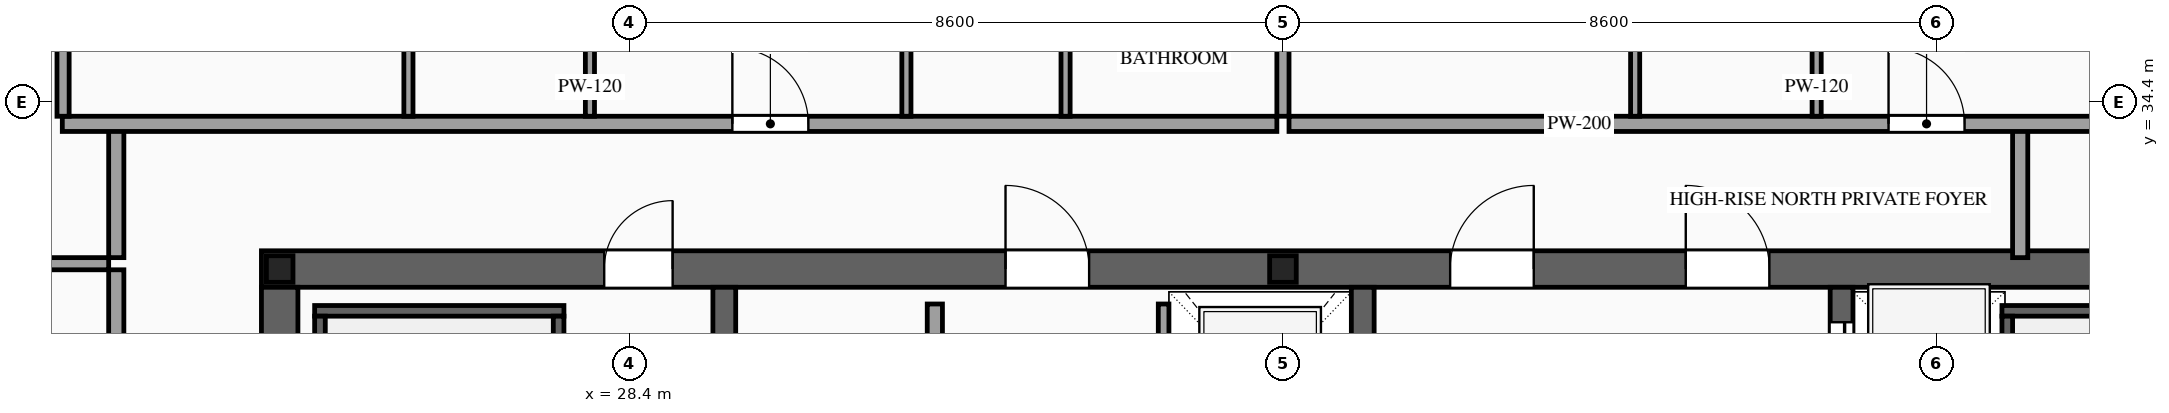
"""IFC4 building model, lengths in metres.
Left out: names, types, materials, properties, quantities, classifications, styles, units other than length and angle.
Written with IfcOpenShell. Run it as: python <this file> out.ifc"""

import sys

from ifc_helpers import new_model, si_unit, direction, frame, frame_2d, origin, origin_2d, place, context, subcontext, project, spatial, rectangle, i_section, extrude, source, transform, mapped, element, fill, save


model = new_model("IFC4")
c1 = context("Model", 3, precision=1e-05, world=origin(), true_north=direction((0.0, 1.0)))
c2 = subcontext(c1, "Body", "Model", "MODEL_VIEW")
j1 = project(units=[si_unit("LENGTHUNIT", "METRE"), si_unit("PLANEANGLEUNIT", "RADIAN")], contexts=[c1])
p1 = place(None, origin())
s1 = spatial("IfcSite", under=j1, at=p1, CompositionType="ELEMENT")
p2 = place(p1, origin())
s2 = spatial("IfcBuilding", under=s1, at=p2, CompositionType="ELEMENT")
p3 = place(p2, frame((0.0, 0.0, 332.2)))
s3 = spatial("IfcBuildingStorey", under=s2, at=p3, CompositionType="ELEMENT", Elevation=332.2)
p4 = place(p3, frame((23.56, 32.2, 0.0), z_axis=(0.0, 0.0, 1.0), x_axis=(1.0, 0.0, 0.0)))
e1 = element("IfcWall", 1, at=p4, inside=s3, PredefinedType="SHEAR", context=c2, shape_type="SweptSolid", body=[
    extrude(rectangle(XDim=26.88, YDim=0.48, at=frame_2d((13.44, 0.0))), origin(), (0.0, 0.0, 1.0), 3.5),
])
p5 = place(p4, frame((4.51, 0.0, 0.0)))
e2 = element("IfcOpeningElement", 2, at=p5, cuts=e1, PredefinedType="OPENING", context=c2, shape_type="SweptSolid", body=[
    extrude(rectangle(XDim=0.9, YDim=2.15, at=frame_2d((0.45, 1.075))), frame((0.0, 0.255, 0.0), z_axis=(0.0, -1.0, 0.0), x_axis=(1.0, 0.0, 0.0)), (0.0, 0.0, 1.0), 0.51),
])
p6 = place(p4, frame((9.79, 0.0, 0.0)))
e3 = element("IfcOpeningElement", 3, at=p6, cuts=e1, PredefinedType="OPENING", context=c2, shape_type="SweptSolid", body=[
    extrude(rectangle(XDim=1.1, YDim=2.2, at=frame_2d((0.55, 1.1))), frame((0.0, 0.255, 0.0), z_axis=(0.0, -1.0, 0.0), x_axis=(1.0, 0.0, 0.0)), (0.0, 0.0, 1.0), 0.51),
])
p7 = place(p4, frame((15.64, 0.0, 0.0)))
e4 = element("IfcOpeningElement", 4, at=p7, cuts=e1, PredefinedType="OPENING", context=c2, shape_type="SweptSolid", body=[
    extrude(rectangle(XDim=1.1, YDim=2.2, at=frame_2d((0.55, 1.1))), frame((0.0, 0.255, 0.0), z_axis=(0.0, -1.0, 0.0), x_axis=(1.0, 0.0, 0.0)), (0.0, 0.0, 1.0), 0.51),
])
p8 = place(p4, frame((18.74, 0.0, 0.0)))
e5 = element("IfcOpeningElement", 5, at=p8, cuts=e1, PredefinedType="OPENING", context=c2, shape_type="SweptSolid", body=[
    extrude(rectangle(XDim=1.1, YDim=2.2, at=frame_2d((0.55, 1.1))), frame((0.0, 0.255, 0.0), z_axis=(0.0, -1.0, 0.0), x_axis=(1.0, 0.0, 0.0)), (0.0, 0.0, 1.0), 0.51),
])
m1 = source(origin(), c2, "Body", "SweptSolid", [
    extrude(rectangle(XDim=12.32, YDim=0.48, at=frame_2d((6.16, 0.0))), origin(), (0.0, 0.0, 1.0), 3.5),
])
p9 = place(p3, frame((23.8, 19.64, 0.0), z_axis=(0.0, 0.0, 1.0), x_axis=(0.0, 1.0, 0.0)))
e6 = element("IfcWall", 6, at=p9, inside=s3, PredefinedType="SHEAR", context=c2, shape_type="MappedRepresentation", body=[
    mapped(m1, transform((0.0, 0.0, 0.0), scale=1.0)),
])
m2 = source(origin(), c2, "Body", "SweptSolid", [
    extrude(rectangle(XDim=12.32, YDim=0.3, at=frame_2d((6.16, 0.0))), origin(), (0.0, 0.0, 1.0), 3.5),
])
for number, where, z_axis, x_axis in (
    (7, (29.65, 19.64, 0.0), (0.0, 0.0, 1.0), (0.0, 1.0, 0.0)),
    (8, (38.05, 19.64, 0.0), (0.0, 0.0, 1.0), (0.0, 1.0, 0.0)),
):
    element("IfcWall", number, at=place(p3, frame(where, z_axis=z_axis, x_axis=x_axis)), inside=s3, PredefinedType="SOLIDWALL", context=c2, shape_type="MappedRepresentation", body=[
        mapped(m2, transform((0.0, 0.0, 0.0), scale=1.0)),
    ])
p10 = place(p3, frame((44.35, 19.64, 0.0), z_axis=(0.0, 0.0, 1.0), x_axis=(0.0, 1.0, 0.0)))
e9 = element("IfcWall", 9, at=p10, inside=s3, PredefinedType="SOLIDWALL", context=c2, shape_type="SweptSolid", body=[
    extrude(rectangle(XDim=12.32, YDim=0.3, at=frame_2d((6.16, 0.0))), origin(), (0.0, 0.0, 1.0), 3.5),
])
p11 = place(p10, frame((6.56, 0.0, 0.0)))
e10 = element("IfcOpeningElement", 10, at=p11, cuts=e9, PredefinedType="OPENING", context=c2, shape_type="SweptSolid", body=[
    extrude(rectangle(XDim=1.1, YDim=2.2, at=frame_2d((0.55, 1.1))), frame((0.0, 0.165, 0.0), z_axis=(0.0, -1.0, 0.0), x_axis=(1.0, 0.0, 0.0)), (0.0, 0.0, 1.0), 0.33),
])
p12 = place(p10, frame((8.66, 0.0, 0.0)))
e11 = element("IfcOpeningElement", 11, at=p12, cuts=e9, PredefinedType="OPENING", context=c2, shape_type="SweptSolid", body=[
    extrude(rectangle(XDim=1.1, YDim=2.2, at=frame_2d((0.55, 1.1))), frame((0.0, 0.165, 0.0), z_axis=(0.0, -1.0, 0.0), x_axis=(1.0, 0.0, 0.0)), (0.0, 0.0, 1.0), 0.33),
])
p13 = place(p10, frame((10.76, 0.0, 0.0)))
e12 = element("IfcOpeningElement", 12, at=p13, cuts=e9, PredefinedType="OPENING", context=c2, shape_type="SweptSolid", body=[
    extrude(rectangle(XDim=1.1, YDim=2.2, at=frame_2d((0.55, 1.1))), frame((0.0, 0.165, 0.0), z_axis=(0.0, -1.0, 0.0), x_axis=(1.0, 0.0, 0.0)), (0.0, 0.0, 1.0), 0.33),
])
m3 = source(origin(), c2, "Body", "SweptSolid", [
    extrude(i_section(OverallWidth=0.35, OverallDepth=0.35, WebThickness=0.012, FlangeThickness=0.019, at=origin_2d()), origin(), (0.0, 0.0, 1.0), 3.5),
])
for number, where, z_axis, x_axis in (
    (13, (23.8, 32.2, 0.0), (0.0, 0.0, 1.0), (1.0, 0.0, 0.0)),
    (14, (37.0, 32.2, 0.0), (0.0, 0.0, 1.0), (1.0, 0.0, 0.0)),
):
    element("IfcColumn", number, at=place(p3, frame(where, z_axis=z_axis, x_axis=x_axis)), inside=s3, PredefinedType="COLUMN", context=c2, shape_type="MappedRepresentation", body=[
        mapped(m3, transform((0.0, 0.0, 0.0), scale=1.0)),
    ])
p14 = place(p3, frame((35.43, 29.4, 0.0), z_axis=(0.0, 0.0, 1.0), x_axis=(0.0, 1.0, 0.0)))
e15 = element("IfcWall", 15, at=p14, inside=s3, PredefinedType="SOLIDWALL", context=c2, shape_type="SweptSolid", body=[
    extrude(rectangle(XDim=2.34, YDim=0.14, at=frame_2d((1.17, 0.0))), origin(), (0.0, 0.0, 1.0), 3.28),
])
p15 = place(p14, frame((0.62, 0.0, 0.0)))
e16 = element("IfcOpeningElement", 16, at=p15, cuts=e15, PredefinedType="OPENING", context=c2, shape_type="SweptSolid", body=[
    extrude(rectangle(XDim=1.1, YDim=2.2, at=frame_2d((0.55, 1.1))), frame((0.0, 0.085, 0.0), z_axis=(0.0, -1.0, 0.0), x_axis=(1.0, 0.0, 0.0)), (0.0, 0.0, 1.0), 0.17),
])
m4 = source(origin(), c2, "Body", "SweptSolid", [
    extrude(rectangle(XDim=3.28, YDim=0.14, at=frame_2d((1.64, 0.0))), origin(), (0.0, 0.0, 1.0), 3.28),
])
p16 = place(p3, frame((24.26, 31.65, 0.0), z_axis=(0.0, 0.0, 1.0), x_axis=(1.0, 0.0, 0.0)))
e17 = element("IfcWall", 17, at=p16, inside=s3, PredefinedType="SOLIDWALL", context=c2, shape_type="MappedRepresentation", body=[
    mapped(m4, transform((0.0, 0.0, 0.0), scale=1.0)),
])
m5 = source(origin(), c2, "Body", "SweptSolid", [
    extrude(rectangle(XDim=8.94, YDim=0.14, at=frame_2d((4.47, 0.0))), origin(), (0.0, 0.0, 1.0), 3.28),
])
for number, where, z_axis, x_axis in (
    (18, (24.33, 22.64, 0.0), (0.0, 0.0, 1.0), (0.0, 1.0, 0.0)),
    (19, (27.47, 22.64, 0.0), (0.0, 0.0, 1.0), (0.0, 1.0, 0.0)),
):
    element("IfcWall", number, at=place(p3, frame(where, z_axis=z_axis, x_axis=x_axis)), inside=s3, PredefinedType="SOLIDWALL", context=c2, shape_type="MappedRepresentation", body=[
        mapped(m5, transform((0.0, 0.0, 0.0), scale=1.0)),
    ])
p17 = place(p3, frame((46.46, 31.65, 0.0), z_axis=(0.0, 0.0, 1.0), x_axis=(1.0, 0.0, 0.0)))
e20 = element("IfcWall", 20, at=p17, inside=s3, PredefinedType="SOLIDWALL", context=c2, shape_type="MappedRepresentation", body=[
    mapped(m4, transform((0.0, 0.0, 0.0), scale=1.0)),
])
p18 = place(p3, frame((46.53, 22.64, 0.0), z_axis=(0.0, 0.0, 1.0), x_axis=(0.0, 1.0, 0.0)))
e21 = element("IfcWall", 21, at=p18, inside=s3, PredefinedType="SOLIDWALL", context=c2, shape_type="MappedRepresentation", body=[
    mapped(m5, transform((0.0, 0.0, 0.0), scale=1.0)),
])
p19 = place(p3, frame((32.42, 24.05, 0.0), z_axis=(0.0, 0.0, 1.0), x_axis=(0.0, 1.0, 0.0)))
e22 = element("IfcWall", 22, at=p19, inside=s3, PredefinedType="PARTITIONING", context=c2, shape_type="SweptSolid", body=[
    extrude(rectangle(XDim=7.69, YDim=0.2, at=frame_2d((3.845, 0.0))), origin(), (0.0, 0.0, 1.0), 3.28),
])
p20 = place(p19, frame((3.395, 0.0, 0.0)))
e23 = element("IfcOpeningElement", 23, at=p20, cuts=e22, PredefinedType="OPENING", context=c2, shape_type="SweptSolid", body=[
    extrude(rectangle(XDim=0.9, YDim=2.15, at=frame_2d((0.45, 1.075))), frame((0.0, 0.115, 0.0), z_axis=(0.0, -1.0, 0.0), x_axis=(1.0, 0.0, 0.0)), (0.0, 0.0, 1.0), 0.23),
])
m6 = source(origin(), c2, "Body", "SweptSolid", [
    extrude(rectangle(XDim=1.7, YDim=0.2, at=frame_2d((0.85, 0.0))), origin(), (0.0, 0.0, 1.0), 3.28),
])
for number, where, z_axis, x_axis in (
    (24, (21.65, 32.35, 0.0), (0.0, 0.0, 1.0), (0.0, 1.0, 0.0)),
    (25, (46.7, 32.35, 0.0), (0.0, 0.0, 1.0), (0.0, 1.0, 0.0)),
):
    element("IfcWall", number, at=place(p3, frame(where, z_axis=z_axis, x_axis=x_axis)), inside=s3, PredefinedType="PARTITIONING", context=c2, shape_type="MappedRepresentation", body=[
        mapped(m6, transform((0.0, 0.0, 0.0), scale=1.0)),
    ])
p21 = place(p3, frame((20.94, 34.11, 0.0), z_axis=(0.0, 0.0, 1.0), x_axis=(1.0, 0.0, 0.0)))
e26 = element("IfcWall", 26, at=p21, inside=s3, PredefinedType="PARTITIONING", context=c2, shape_type="SweptSolid", body=[
    extrude(rectangle(XDim=15.98, YDim=0.2, at=frame_2d((7.99, 0.0))), origin(), (0.0, 0.0, 1.0), 3.28),
])
p22 = place(p21, frame((8.816, 0.0, 0.0)))
e27 = element("IfcOpeningElement", 27, at=p22, cuts=e26, PredefinedType="OPENING", context=c2, shape_type="SweptSolid", body=[
    extrude(rectangle(XDim=1.0, YDim=2.2, at=frame_2d((0.5, 1.1))), frame((0.0, 0.115, 0.0), z_axis=(0.0, -1.0, 0.0), x_axis=(1.0, 0.0, 0.0)), (0.0, 0.0, 1.0), 0.23),
])
m7 = source(origin(), c2, "Body", "SweptSolid", [
    extrude(rectangle(XDim=10.54, YDim=0.16, at=frame_2d((5.27, 0.0))), origin(), (0.0, 0.0, 1.0), 2.787),
])
p23 = place(p3, frame((37.0, 34.21, 0.0), z_axis=(0.0, 0.0, 1.0), x_axis=(0.0, 1.0, 0.0)))
e28 = element("IfcWall", 28, at=p23, inside=s3, PredefinedType="PARTITIONING", context=c2, shape_type="MappedRepresentation", body=[
    mapped(m7, transform((0.0, 0.0, 0.0), scale=1.0)),
])
m8 = source(origin(), c2, "Body", "SweptSolid", [
    extrude(rectangle(XDim=2.9, YDim=0.12, at=frame_2d((1.45, 0.0))), origin(), (0.0, 0.0, 1.0), 3.28),
])
p24 = place(p3, frame((25.494, 34.21, 0.0), z_axis=(0.0, 0.0, 1.0), x_axis=(0.0, 1.0, 0.0)))
e29 = element("IfcWall", 29, at=p24, inside=s3, PredefinedType="PARTITIONING", context=c2, shape_type="MappedRepresentation", body=[
    mapped(m8, transform((0.0, 0.0, 0.0), scale=1.0)),
])
p25 = place(p3, frame((27.882, 34.21, 0.0), z_axis=(0.0, 0.0, 1.0), x_axis=(0.0, 1.0, 0.0)))
e30 = element("IfcWall", 30, at=p25, inside=s3, PredefinedType="PARTITIONING", context=c2, shape_type="SweptSolid", body=[
    extrude(rectangle(XDim=2.9, YDim=0.12, at=frame_2d((1.45, 0.0))), origin(), (0.0, 0.0, 1.0), 3.28),
])
p26 = place(p25, frame((1.025, 0.0, 0.0)))
e31 = element("IfcOpeningElement", 31, at=p26, cuts=e30, PredefinedType="OPENING", context=c2, shape_type="SweptSolid", body=[
    extrude(rectangle(XDim=0.85, YDim=2.1, at=frame_2d((0.425, 1.05))), frame((0.0, 0.075, 0.0), z_axis=(0.0, -1.0, 0.0), x_axis=(1.0, 0.0, 0.0)), (0.0, 0.0, 1.0), 0.15),
])
for number, where, z_axis, x_axis in (
    (32, (34.14, 34.21, 0.0), (0.0, 0.0, 1.0), (0.0, 1.0, 0.0)),
    (33, (32.046, 34.21, 0.0), (0.0, 0.0, 1.0), (0.0, 1.0, 0.0)),
):
    element("IfcWall", number, at=place(p3, frame(where, z_axis=z_axis, x_axis=x_axis)), inside=s3, PredefinedType="PARTITIONING", context=c2, shape_type="MappedRepresentation", body=[
        mapped(m8, transform((0.0, 0.0, 0.0), scale=1.0)),
    ])
p27 = place(p3, frame((37.08, 34.11, 0.0), z_axis=(0.0, 0.0, 1.0), x_axis=(1.0, 0.0, 0.0)))
e34 = element("IfcWall", 34, at=p27, inside=s3, PredefinedType="PARTITIONING", context=c2, shape_type="SweptSolid", body=[
    extrude(rectangle(XDim=15.98, YDim=0.2, at=frame_2d((7.99, 0.0))), origin(), (0.0, 0.0, 1.0), 3.28),
])
p28 = place(p27, frame((7.888, 0.0, 0.0)))
e35 = element("IfcOpeningElement", 35, at=p28, cuts=e34, PredefinedType="OPENING", context=c2, shape_type="SweptSolid", body=[
    extrude(rectangle(XDim=1.0, YDim=2.2, at=frame_2d((0.5, 1.1))), frame((0.0, 0.115, 0.0), z_axis=(0.0, -1.0, 0.0), x_axis=(1.0, 0.0, 0.0)), (0.0, 0.0, 1.0), 0.23),
])
m9 = source(origin(), c2, "Body", "SweptSolid", [
    extrude(rectangle(XDim=10.39, YDim=0.16, at=frame_2d((5.195, 0.0))), origin(), (0.0, 0.0, 1.0), 3.28),
])
p29 = place(p3, frame((20.95, 34.21, 0.0), z_axis=(0.0, 0.0, 1.0), x_axis=(0.0, 1.0, 0.0)))
e36 = element("IfcWall", 36, at=p29, inside=s3, PredefinedType="PARTITIONING", context=c2, shape_type="MappedRepresentation", body=[
    mapped(m9, transform((0.0, 0.0, 0.0), scale=1.0)),
])
p30 = place(p3, frame((41.634, 34.21, 0.0), z_axis=(0.0, 0.0, 1.0), x_axis=(0.0, 1.0, 0.0)))
e37 = element("IfcWall", 37, at=p30, inside=s3, PredefinedType="PARTITIONING", context=c2, shape_type="MappedRepresentation", body=[
    mapped(m8, transform((0.0, 0.0, 0.0), scale=1.0)),
])
p31 = place(p3, frame((44.022, 34.21, 0.0), z_axis=(0.0, 0.0, 1.0), x_axis=(0.0, 1.0, 0.0)))
e38 = element("IfcWall", 38, at=p31, inside=s3, PredefinedType="PARTITIONING", context=c2, shape_type="SweptSolid", body=[
    extrude(rectangle(XDim=2.9, YDim=0.12, at=frame_2d((1.45, 0.0))), origin(), (0.0, 0.0, 1.0), 3.28),
])
p32 = place(p31, frame((1.025, 0.0, 0.0)))
e39 = element("IfcOpeningElement", 39, at=p32, cuts=e38, PredefinedType="OPENING", context=c2, shape_type="SweptSolid", body=[
    extrude(rectangle(XDim=0.85, YDim=2.1, at=frame_2d((0.425, 1.05))), frame((0.0, 0.075, 0.0), z_axis=(0.0, -1.0, 0.0), x_axis=(1.0, 0.0, 0.0)), (0.0, 0.0, 1.0), 0.15),
])
p33 = place(p3, frame((21.65, 19.41, 0.0), z_axis=(0.0, 0.0, 1.0), x_axis=(0.0, 1.0, 0.0)))
e40 = element("IfcWall", 40, at=p33, inside=s3, PredefinedType="PARTITIONING", context=c2, shape_type="SweptSolid", body=[
    extrude(rectangle(XDim=12.78, YDim=0.2, at=frame_2d((6.39, 0.0))), origin(), (0.0, 0.0, 1.0), 3.28),
])
p34 = place(p33, frame((5.89, 0.0, 0.0)))
e41 = element("IfcOpeningElement", 41, at=p34, cuts=e40, PredefinedType="OPENING", context=c2, shape_type="SweptSolid", body=[
    extrude(rectangle(XDim=1.0, YDim=2.2, at=frame_2d((0.5, 1.1))), frame((0.0, 0.115, 0.0), z_axis=(0.0, -1.0, 0.0), x_axis=(1.0, 0.0, 0.0)), (0.0, 0.0, 1.0), 0.23),
])
m10 = source(origin(), c2, "Body", "SweptSolid", [
    extrude(rectangle(XDim=3.5, YDim=0.16, at=frame_2d((1.75, 0.0))), origin(), (0.0, 0.0, 1.0), 2.825),
])
p35 = place(p3, frame((18.05, 32.27, 0.0), z_axis=(0.0, 0.0, 1.0), x_axis=(1.0, 0.0, 0.0)))
e42 = element("IfcWall", 42, at=p35, inside=s3, PredefinedType="PARTITIONING", context=c2, shape_type="MappedRepresentation", body=[
    mapped(m10, transform((0.0, 0.0, 0.0), scale=1.0)),
])
m11 = source(origin(), c2, "Body", "SweptSolid", [
    extrude(rectangle(XDim=1.1, YDim=2.2, at=frame_2d((0.55, 1.1))), frame((0.0, 0.025, 0.0), z_axis=(0.0, -1.0, 0.0), x_axis=(1.0, 0.0, 0.0)), (0.0, 0.0, 1.0), 0.05),
])
p36 = place(p13, origin())
e43 = element("IfcDoor", 43, at=p36, inside=s3, OperationType="SLIDING_TO_LEFT", PredefinedType="DOOR", context=c2, shape_type="MappedRepresentation", body=[
    mapped(m11, transform((0.0, 0.0, 0.0), scale=1.0)),
])
fill(e12, e43)
m12 = source(origin(), c2, "Body", "SweptSolid", [
    extrude(rectangle(XDim=0.9, YDim=2.15, at=frame_2d((0.45, 1.075))), frame((0.0, 0.025, 0.0), z_axis=(0.0, -1.0, 0.0), x_axis=(1.0, 0.0, 0.0)), (0.0, 0.0, 1.0), 0.05),
])
p37 = place(p5, origin())
e44 = element("IfcDoor", 44, at=p37, inside=s3, OperationType="SINGLE_SWING_RIGHT", PredefinedType="DOOR", context=c2, shape_type="MappedRepresentation", body=[
    mapped(m12, transform((0.0, 0.0, 0.0), scale=1.0)),
])
fill(e2, e44)
m13 = source(origin(), c2, "Body", "SweptSolid", [
    extrude(rectangle(XDim=1.1, YDim=2.2, at=frame_2d((0.55, 1.1))), frame((0.0, 0.025, 0.0), z_axis=(0.0, -1.0, 0.0), x_axis=(1.0, 0.0, 0.0)), (0.0, 0.0, 1.0), 0.05),
])
p38 = place(p6, origin())
e45 = element("IfcDoor", 45, at=p38, inside=s3, OperationType="SINGLE_SWING_LEFT", PredefinedType="DOOR", context=c2, shape_type="MappedRepresentation", body=[
    mapped(m13, transform((0.0, 0.0, 0.0), scale=1.0)),
])
fill(e3, e45)
p39 = place(p7, origin())
e46 = element("IfcDoor", 46, at=p39, inside=s3, OperationType="SINGLE_SWING_RIGHT", PredefinedType="DOOR", context=c2, shape_type="MappedRepresentation", body=[
    mapped(m13, transform((0.0, 0.0, 0.0), scale=1.0)),
])
fill(e4, e46)
p40 = place(p8, origin())
e47 = element("IfcDoor", 47, at=p40, inside=s3, OperationType="SINGLE_SWING_LEFT", PredefinedType="DOOR", context=c2, shape_type="MappedRepresentation", body=[
    mapped(m13, transform((0.0, 0.0, 0.0), scale=1.0)),
])
fill(e5, e47)
m14 = source(origin(), c2, "Body", "SweptSolid", [
    extrude(rectangle(XDim=1.0, YDim=2.2, at=frame_2d((0.5, 1.1))), frame((0.0, 0.025, 0.0), z_axis=(0.0, -1.0, 0.0), x_axis=(1.0, 0.0, 0.0)), (0.0, 0.0, 1.0), 0.05),
])
p41 = place(p22, origin())
e48 = element("IfcDoor", 48, at=p41, inside=s3, OperationType="SINGLE_SWING_LEFT", PredefinedType="DOOR", context=c2, shape_type="MappedRepresentation", body=[
    mapped(m14, transform((0.0, 0.0, 0.0), scale=1.0)),
])
fill(e27, e48)
p42 = place(p28, origin())
e49 = element("IfcDoor", 49, at=p42, inside=s3, OperationType="SINGLE_SWING_LEFT", PredefinedType="DOOR", context=c2, shape_type="MappedRepresentation", body=[
    mapped(m14, transform((0.0, 0.0, 0.0), scale=1.0)),
])
fill(e35, e49)
save(model, sys.argv[1])
